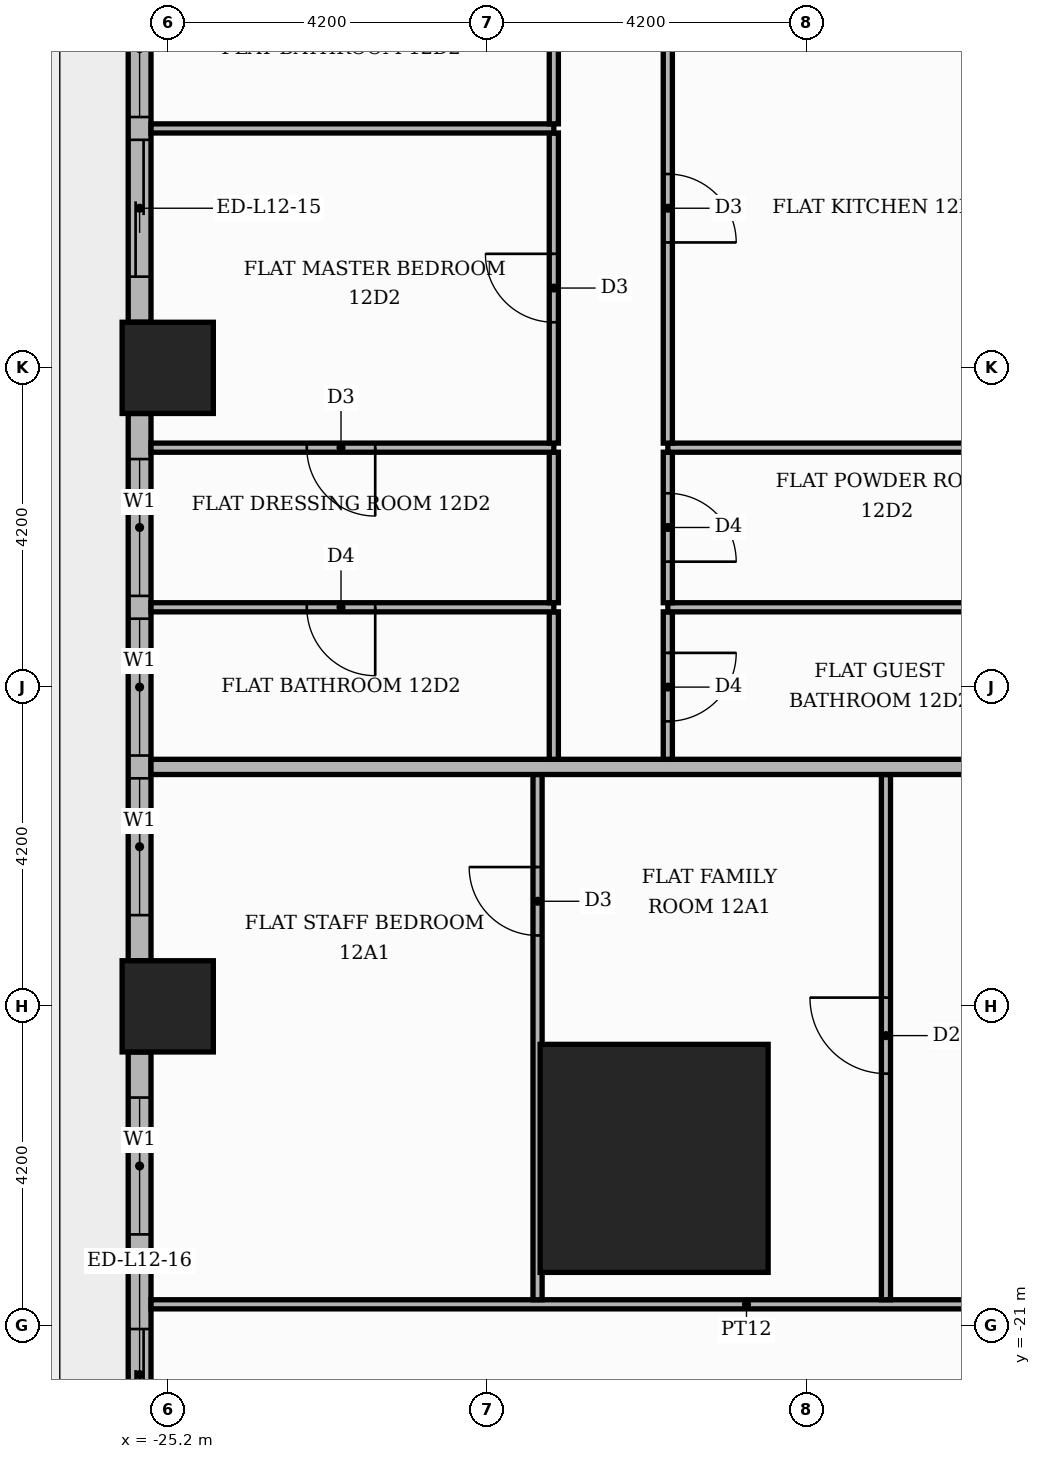
"""IFC4 building model, lengths in metres.
Left out: names, types, materials, properties, quantities, classifications, styles, units other than length and angle.
Written with IfcOpenShell. Run it as: python <this file> out.ifc"""

import sys

from ifc_helpers import new_model, si_unit, direction, frame, frame_2d, origin, origin_2d, place, context, subcontext, project, spatial, rectangle, extrude, element, fill, save


model = new_model("IFC4")
c1 = context("Model", 3, precision=1e-05, world=origin(), true_north=direction((0.0, 1.0)))
c2 = subcontext(c1, "Body", "Model", "MODEL_VIEW")
j1 = project(units=[si_unit("LENGTHUNIT", "METRE"), si_unit("PLANEANGLEUNIT", "RADIAN")], contexts=[c1])
p1 = place(None, origin())
s1 = spatial("IfcSite", under=j1, at=p1, CompositionType="ELEMENT")
p2 = place(p1, origin())
s2 = spatial("IfcBuilding", under=s1, at=p2, CompositionType="ELEMENT")
p3 = place(p2, frame((0.0, 0.0, 54.3)))
s3 = spatial("IfcBuildingStorey", under=s2, at=p3, CompositionType="ELEMENT", Elevation=54.3)
p4 = place(p3, frame((-18.8, -18.8, 0.0), z_axis=(0.0, 0.0, 1.0), x_axis=(1.0, 0.0, 0.0)))
e1 = element("IfcColumn", 1, at=p4, inside=s3, PredefinedType="COLUMN", context=c2, shape_type="SweptSolid", body=[
    extrude(rectangle(XDim=3.0, YDim=3.0, at=origin_2d()), origin(), (0.0, 0.0, 1.0), 3.9),
])
for number, where, z_axis, x_axis in (
    (2, (-25.2, -8.4, 0.0), (0.0, 0.0, 1.0), (1.0, 0.0, 0.0)),
    (3, (-25.2, -16.8, 0.0), (0.0, 0.0, 1.0), (1.0, 0.0, 0.0)),
):
    element("IfcColumn", number, at=place(p3, frame(where, z_axis=z_axis, x_axis=x_axis)), inside=s3, PredefinedType="COLUMN", context=c2, shape_type="SweptSolid", body=[
        extrude(rectangle(XDim=1.2, YDim=1.2, at=origin_2d()), origin(), (0.0, 0.0, 1.0), 3.9),
    ])
p5 = place(p3, frame((-25.57, -0.6, 0.0), z_axis=(0.0, 0.0, 1.0), x_axis=(0.0, -1.0, 0.0)))
e4 = element("IfcWall", 4, at=p5, inside=s3, PredefinedType="STANDARD", context=c2, shape_type="SweptSolid", body=[
    extrude(rectangle(XDim=7.2, YDim=0.3, at=frame_2d((3.6, 0.0))), origin(), (0.0, 0.0, 1.0), 3.48),
])
p6 = place(p5, frame((0.6, 0.0, 0.9)))
e5 = element("IfcOpeningElement", 5, at=p6, cuts=e4, PredefinedType="OPENING", context=c2, shape_type="SweptSolid", body=[
    extrude(rectangle(XDim=1.8, YDim=2.1, at=frame_2d((0.9, 1.05))), frame((0.0, 0.16, 0.0), z_axis=(0.0, -1.0, 0.0), x_axis=(1.0, 0.0, 0.0)), (0.0, 0.0, 1.0), 0.32),
])
p7 = place(p5, frame((2.7, 0.0, 0.9)))
e6 = element("IfcOpeningElement", 6, at=p7, cuts=e4, PredefinedType="OPENING", context=c2, shape_type="SweptSolid", body=[
    extrude(rectangle(XDim=1.8, YDim=2.1, at=frame_2d((0.9, 1.05))), frame((0.0, 0.16, 0.0), z_axis=(0.0, -1.0, 0.0), x_axis=(1.0, 0.0, 0.0)), (0.0, 0.0, 1.0), 0.32),
])
p8 = place(p5, frame((4.8, 0.0, 0.0)))
e7 = element("IfcOpeningElement", 7, at=p8, cuts=e4, PredefinedType="OPENING", context=c2, shape_type="SweptSolid", body=[
    extrude(rectangle(XDim=1.8, YDim=2.4, at=frame_2d((0.9, 1.2))), frame((0.0, 0.16, 0.0), z_axis=(0.0, -1.0, 0.0), x_axis=(1.0, 0.0, 0.0)), (0.0, 0.0, 1.0), 0.32),
])
p9 = place(p3, frame((-25.57, -9.0, 0.0), z_axis=(0.0, 0.0, 1.0), x_axis=(0.0, -1.0, 0.0)))
e8 = element("IfcWall", 8, at=p9, inside=s3, PredefinedType="STANDARD", context=c2, shape_type="SweptSolid", body=[
    extrude(rectangle(XDim=7.2, YDim=0.3, at=frame_2d((3.6, 0.0))), origin(), (0.0, 0.0, 1.0), 3.48),
])
p10 = place(p9, frame((0.6, 0.0, 0.9)))
e9 = element("IfcOpeningElement", 9, at=p10, cuts=e8, PredefinedType="OPENING", context=c2, shape_type="SweptSolid", body=[
    extrude(rectangle(XDim=1.8, YDim=2.1, at=frame_2d((0.9, 1.05))), frame((0.0, 0.16, 0.0), z_axis=(0.0, -1.0, 0.0), x_axis=(1.0, 0.0, 0.0)), (0.0, 0.0, 1.0), 0.32),
])
p11 = place(p9, frame((2.7, 0.0, 0.9)))
e10 = element("IfcOpeningElement", 10, at=p11, cuts=e8, PredefinedType="OPENING", context=c2, shape_type="SweptSolid", body=[
    extrude(rectangle(XDim=1.8, YDim=2.1, at=frame_2d((0.9, 1.05))), frame((0.0, 0.16, 0.0), z_axis=(0.0, -1.0, 0.0), x_axis=(1.0, 0.0, 0.0)), (0.0, 0.0, 1.0), 0.32),
])
p12 = place(p9, frame((4.8, 0.0, 0.9)))
e11 = element("IfcOpeningElement", 11, at=p12, cuts=e8, PredefinedType="OPENING", context=c2, shape_type="SweptSolid", body=[
    extrude(rectangle(XDim=1.8, YDim=2.1, at=frame_2d((0.9, 1.05))), frame((0.0, 0.16, 0.0), z_axis=(0.0, -1.0, 0.0), x_axis=(1.0, 0.0, 0.0)), (0.0, 0.0, 1.0), 0.32),
])
p13 = place(p3, frame((-25.57, -17.4, 0.0), z_axis=(0.0, 0.0, 1.0), x_axis=(0.0, -1.0, 0.0)))
e12 = element("IfcWall", 12, at=p13, inside=s3, PredefinedType="STANDARD", context=c2, shape_type="SweptSolid", body=[
    extrude(rectangle(XDim=5.32, YDim=0.3, at=frame_2d((2.66, 0.0))), origin(), (0.0, 0.0, 1.0), 3.48),
])
p14 = place(p13, frame((0.6, 0.0, 0.9)))
e13 = element("IfcOpeningElement", 13, at=p14, cuts=e12, PredefinedType="OPENING", context=c2, shape_type="SweptSolid", body=[
    extrude(rectangle(XDim=1.8, YDim=2.1, at=frame_2d((0.9, 1.05))), frame((0.0, 0.16, 0.0), z_axis=(0.0, -1.0, 0.0), x_axis=(1.0, 0.0, 0.0)), (0.0, 0.0, 1.0), 0.32),
])
p15 = place(p13, frame((3.645, 0.0, 0.0)))
e14 = element("IfcOpeningElement", 14, at=p15, cuts=e12, PredefinedType="OPENING", context=c2, shape_type="SweptSolid", body=[
    extrude(rectangle(XDim=1.2, YDim=2.4, at=frame_2d((0.6, 1.2))), frame((0.0, 0.16, 0.0), z_axis=(0.0, -1.0, 0.0), x_axis=(1.0, 0.0, 0.0)), (0.0, 0.0, 1.0), 0.32),
])
p16 = place(p3, frame((-25.42, -20.72, 0.0), z_axis=(0.0, 0.0, 1.0), x_axis=(1.0, 0.0, 0.0)))
e15 = element("IfcWall", 15, at=p16, inside=s3, PredefinedType="PARTITIONING", context=c2, shape_type="SweptSolid", body=[
    extrude(rectangle(XDim=15.67, YDim=0.12, at=frame_2d((7.835, 0.0))), origin(), (0.0, 0.0, 1.0), 3.48),
])
p17 = place(p16, frame((12.32, 0.0, 0.0)))
e16 = element("IfcOpeningElement", 16, at=p17, cuts=e15, PredefinedType="OPENING", context=c2, shape_type="SweptSolid", body=[
    extrude(rectangle(XDim=1.0, YDim=2.1, at=frame_2d((0.5, 1.05))), frame((0.0, 0.07, 0.0), z_axis=(0.0, -1.0, 0.0), x_axis=(1.0, 0.0, 0.0)), (0.0, 0.0, 1.0), 0.14),
])
p18 = place(p3, frame((-20.334, -20.66, 0.0), z_axis=(0.0, 0.0, 1.0), x_axis=(0.0, 1.0, 0.0)))
e17 = element("IfcWall", 17, at=p18, inside=s3, PredefinedType="PARTITIONING", context=c2, shape_type="SweptSolid", body=[
    extrude(rectangle(XDim=6.91, YDim=0.12, at=frame_2d((3.455, 0.0))), origin(), (0.0, 0.0, 1.0), 3.48),
])
p19 = place(p18, frame((4.792, 0.0, 0.0)))
e18 = element("IfcOpeningElement", 18, at=p19, cuts=e17, PredefinedType="OPENING", context=c2, shape_type="SweptSolid", body=[
    extrude(rectangle(XDim=0.9, YDim=2.1, at=frame_2d((0.45, 1.05))), frame((0.0, 0.07, 0.0), z_axis=(0.0, -1.0, 0.0), x_axis=(1.0, 0.0, 0.0)), (0.0, 0.0, 1.0), 0.14),
])
p20 = place(p3, frame((-15.75, -20.66, 0.0), z_axis=(0.0, 0.0, 1.0), x_axis=(0.0, 1.0, 0.0)))
e19 = element("IfcWall", 19, at=p20, inside=s3, PredefinedType="PARTITIONING", context=c2, shape_type="SweptSolid", body=[
    extrude(rectangle(XDim=6.91, YDim=0.12, at=frame_2d((3.455, 0.0))), origin(), (0.0, 0.0, 1.0), 3.48),
])
p21 = place(p20, frame((2.975, 0.0, 0.0)))
e20 = element("IfcOpeningElement", 20, at=p21, cuts=e19, PredefinedType="OPENING", context=c2, shape_type="SweptSolid", body=[
    extrude(rectangle(XDim=1.0, YDim=2.1, at=frame_2d((0.5, 1.05))), frame((0.0, 0.07, 0.0), z_axis=(0.0, -1.0, 0.0), x_axis=(1.0, 0.0, 0.0)), (0.0, 0.0, 1.0), 0.14),
])
p22 = place(p3, frame((-25.42, -13.65, 0.0), z_axis=(0.0, 0.0, 1.0), x_axis=(1.0, 0.0, 0.0)))
e21 = element("IfcWall", 21, at=p22, inside=s3, PredefinedType="PARTITIONING", context=c2, shape_type="SweptSolid", body=[
    extrude(rectangle(XDim=39.07, YDim=0.2, at=frame_2d((19.535, 0.0))), origin(), (0.0, 0.0, 1.0), 3.48),
])
p23 = place(p22, frame((13.32, 0.0, 0.0)))
e22 = element("IfcOpeningElement", 22, at=p23, cuts=e21, PredefinedType="OPENING", context=c2, shape_type="SweptSolid", body=[
    extrude(rectangle(XDim=1.1, YDim=2.4, at=frame_2d((0.55, 1.2))), frame((0.0, 0.11, 0.0), z_axis=(0.0, -1.0, 0.0), x_axis=(1.0, 0.0, 0.0)), (0.0, 0.0, 1.0), 0.22),
])
p24 = place(p22, frame((25.92, 0.0, 0.0)))
e23 = element("IfcOpeningElement", 23, at=p24, cuts=e21, PredefinedType="OPENING", context=c2, shape_type="SweptSolid", body=[
    extrude(rectangle(XDim=1.1, YDim=2.4, at=frame_2d((0.55, 1.2))), frame((0.0, 0.11, 0.0), z_axis=(0.0, -1.0, 0.0), x_axis=(1.0, 0.0, 0.0)), (0.0, 0.0, 1.0), 0.22),
])
p25 = place(p3, frame((-20.12, -13.55, 0.0), z_axis=(0.0, 0.0, 1.0), x_axis=(0.0, 1.0, 0.0)))
e24 = element("IfcWall", 24, at=p25, inside=s3, PredefinedType="PARTITIONING", context=c2, shape_type="SweptSolid", body=[
    extrude(rectangle(XDim=1.94, YDim=0.12, at=frame_2d((0.97, 0.0))), origin(), (0.0, 0.0, 1.0), 3.48),
])
p26 = place(p3, frame((-18.62, -13.55, 0.0), z_axis=(0.0, 0.0, 1.0), x_axis=(0.0, 1.0, 0.0)))
e25 = element("IfcWall", 25, at=p26, inside=s3, PredefinedType="PARTITIONING", context=c2, shape_type="SweptSolid", body=[
    extrude(rectangle(XDim=1.94, YDim=0.12, at=frame_2d((0.97, 0.0))), origin(), (0.0, 0.0, 1.0), 3.48),
])
p27 = place(p26, frame((0.5, 0.0, 0.0)))
e26 = element("IfcOpeningElement", 26, at=p27, cuts=e25, PredefinedType="OPENING", context=c2, shape_type="SweptSolid", body=[
    extrude(rectangle(XDim=0.9, YDim=2.1, at=frame_2d((0.45, 1.05))), frame((0.0, 0.07, 0.0), z_axis=(0.0, -1.0, 0.0), x_axis=(1.0, 0.0, 0.0)), (0.0, 0.0, 1.0), 0.14),
])
p28 = place(p3, frame((-25.42, -11.55, 0.0), z_axis=(0.0, 0.0, 1.0), x_axis=(1.0, 0.0, 0.0)))
e27 = element("IfcWall", 27, at=p28, inside=s3, PredefinedType="PARTITIONING", context=c2, shape_type="SweptSolid", body=[
    extrude(rectangle(XDim=5.3, YDim=0.12, at=frame_2d((2.65, 0.0))), origin(), (0.0, 0.0, 1.0), 3.48),
])
p29 = place(p28, frame((2.05, 0.0, 0.0)))
e28 = element("IfcOpeningElement", 28, at=p29, cuts=e27, PredefinedType="OPENING", context=c2, shape_type="SweptSolid", body=[
    extrude(rectangle(XDim=0.9, YDim=2.1, at=frame_2d((0.45, 1.05))), frame((0.0, 0.07, 0.0), z_axis=(0.0, -1.0, 0.0), x_axis=(1.0, 0.0, 0.0)), (0.0, 0.0, 1.0), 0.14),
])
p30 = place(p3, frame((-18.62, -11.55, 0.0), z_axis=(0.0, 0.0, 1.0), x_axis=(1.0, 0.0, 0.0)))
e29 = element("IfcWall", 29, at=p30, inside=s3, PredefinedType="PARTITIONING", context=c2, shape_type="SweptSolid", body=[
    extrude(rectangle(XDim=4.87, YDim=0.12, at=frame_2d((2.435, 0.0))), origin(), (0.0, 0.0, 1.0), 3.48),
])
p31 = place(p3, frame((-20.12, -11.49, 0.0), z_axis=(0.0, 0.0, 1.0), x_axis=(0.0, 1.0, 0.0)))
e30 = element("IfcWall", 30, at=p31, inside=s3, PredefinedType="PARTITIONING", context=c2, shape_type="SweptSolid", body=[
    extrude(rectangle(XDim=1.98, YDim=0.12, at=frame_2d((0.99, 0.0))), origin(), (0.0, 0.0, 1.0), 3.48),
])
p32 = place(p3, frame((-18.62, -11.49, 0.0), z_axis=(0.0, 0.0, 1.0), x_axis=(0.0, 1.0, 0.0)))
e31 = element("IfcWall", 31, at=p32, inside=s3, PredefinedType="PARTITIONING", context=c2, shape_type="SweptSolid", body=[
    extrude(rectangle(XDim=1.98, YDim=0.12, at=frame_2d((0.99, 0.0))), origin(), (0.0, 0.0, 1.0), 3.48),
])
p33 = place(p32, frame((0.54, 0.0, 0.0)))
e32 = element("IfcOpeningElement", 32, at=p33, cuts=e31, PredefinedType="OPENING", context=c2, shape_type="SweptSolid", body=[
    extrude(rectangle(XDim=0.9, YDim=2.1, at=frame_2d((0.45, 1.05))), frame((0.0, 0.07, 0.0), z_axis=(0.0, -1.0, 0.0), x_axis=(1.0, 0.0, 0.0)), (0.0, 0.0, 1.0), 0.14),
])
p34 = place(p3, frame((-25.42, -9.45, 0.0), z_axis=(0.0, 0.0, 1.0), x_axis=(1.0, 0.0, 0.0)))
e33 = element("IfcWall", 33, at=p34, inside=s3, PredefinedType="PARTITIONING", context=c2, shape_type="SweptSolid", body=[
    extrude(rectangle(XDim=5.3, YDim=0.12, at=frame_2d((2.65, 0.0))), origin(), (0.0, 0.0, 1.0), 3.48),
])
p35 = place(p34, frame((2.05, 0.0, 0.0)))
e34 = element("IfcOpeningElement", 34, at=p35, cuts=e33, PredefinedType="OPENING", context=c2, shape_type="SweptSolid", body=[
    extrude(rectangle(XDim=0.9, YDim=2.1, at=frame_2d((0.45, 1.05))), frame((0.0, 0.07, 0.0), z_axis=(0.0, -1.0, 0.0), x_axis=(1.0, 0.0, 0.0)), (0.0, 0.0, 1.0), 0.14),
])
p36 = place(p3, frame((-18.62, -9.45, 0.0), z_axis=(0.0, 0.0, 1.0), x_axis=(1.0, 0.0, 0.0)))
e35 = element("IfcWall", 35, at=p36, inside=s3, PredefinedType="PARTITIONING", context=c2, shape_type="SweptSolid", body=[
    extrude(rectangle(XDim=4.87, YDim=0.12, at=frame_2d((2.435, 0.0))), origin(), (0.0, 0.0, 1.0), 3.48),
])
p37 = place(p3, frame((-20.12, -9.39, 0.0), z_axis=(0.0, 0.0, 1.0), x_axis=(0.0, 1.0, 0.0)))
e36 = element("IfcWall", 36, at=p37, inside=s3, PredefinedType="PARTITIONING", context=c2, shape_type="SweptSolid", body=[
    extrude(rectangle(XDim=4.08, YDim=0.12, at=frame_2d((2.04, 0.0))), origin(), (0.0, 0.0, 1.0), 3.48),
])
p38 = place(p37, frame((1.59, 0.0, 0.0)))
e37 = element("IfcOpeningElement", 37, at=p38, cuts=e36, PredefinedType="OPENING", context=c2, shape_type="SweptSolid", body=[
    extrude(rectangle(XDim=0.9, YDim=2.1, at=frame_2d((0.45, 1.05))), frame((0.0, 0.07, 0.0), z_axis=(0.0, -1.0, 0.0), x_axis=(1.0, 0.0, 0.0)), (0.0, 0.0, 1.0), 0.14),
])
p39 = place(p3, frame((-18.62, -9.39, 0.0), z_axis=(0.0, 0.0, 1.0), x_axis=(0.0, 1.0, 0.0)))
e38 = element("IfcWall", 38, at=p39, inside=s3, PredefinedType="PARTITIONING", context=c2, shape_type="SweptSolid", body=[
    extrude(rectangle(XDim=6.18, YDim=0.12, at=frame_2d((3.09, 0.0))), origin(), (0.0, 0.0, 1.0), 3.48),
])
p40 = place(p39, frame((2.64, 0.0, 0.0)))
e39 = element("IfcOpeningElement", 39, at=p40, cuts=e38, PredefinedType="OPENING", context=c2, shape_type="SweptSolid", body=[
    extrude(rectangle(XDim=0.9, YDim=2.1, at=frame_2d((0.45, 1.05))), frame((0.0, 0.07, 0.0), z_axis=(0.0, -1.0, 0.0), x_axis=(1.0, 0.0, 0.0)), (0.0, 0.0, 1.0), 0.14),
])
p41 = place(p3, frame((-25.42, -5.25, 0.0), z_axis=(0.0, 0.0, 1.0), x_axis=(1.0, 0.0, 0.0)))
e40 = element("IfcWall", 40, at=p41, inside=s3, PredefinedType="PARTITIONING", context=c2, shape_type="SweptSolid", body=[
    extrude(rectangle(XDim=5.3, YDim=0.12, at=frame_2d((2.65, 0.0))), origin(), (0.0, 0.0, 1.0), 3.48),
])
p42 = place(p3, frame((-20.12, -5.19, 0.0), z_axis=(0.0, 0.0, 1.0), x_axis=(0.0, 1.0, 0.0)))
e41 = element("IfcWall", 41, at=p42, inside=s3, PredefinedType="PARTITIONING", context=c2, shape_type="SweptSolid", body=[
    extrude(rectangle(XDim=1.98, YDim=0.12, at=frame_2d((0.99, 0.0))), origin(), (0.0, 0.0, 1.0), 3.48),
])
p43 = place(p7, origin())
e42 = element("IfcWindow", 42, at=p43, inside=s3, PartitioningType="SINGLE_PANEL", PredefinedType="WINDOW", context=c2, shape_type="SweptSolid", body=[
    extrude(rectangle(XDim=1.8, YDim=2.1, at=frame_2d((0.9, 1.05))), frame((0.0, 0.03, 0.0), z_axis=(0.0, -1.0, 0.0), x_axis=(1.0, 0.0, 0.0)), (0.0, 0.0, 1.0), 0.06),
])
fill(e6, e42)
p44 = place(p8, origin())
e43 = element("IfcDoor", 43, at=p44, inside=s3, OperationType="SLIDING_TO_RIGHT", PredefinedType="DOOR", context=c2, shape_type="SweptSolid", body=[
    extrude(rectangle(XDim=1.8, YDim=2.4, at=frame_2d((0.9, 1.2))), frame((0.0, 0.025, 0.0), z_axis=(0.0, -1.0, 0.0), x_axis=(1.0, 0.0, 0.0)), (0.0, 0.0, 1.0), 0.05),
])
fill(e7, e43)
p45 = place(p10, origin())
e44 = element("IfcWindow", 44, at=p45, inside=s3, PartitioningType="SINGLE_PANEL", PredefinedType="WINDOW", context=c2, shape_type="SweptSolid", body=[
    extrude(rectangle(XDim=1.8, YDim=2.1, at=frame_2d((0.9, 1.05))), frame((0.0, 0.03, 0.0), z_axis=(0.0, -1.0, 0.0), x_axis=(1.0, 0.0, 0.0)), (0.0, 0.0, 1.0), 0.06),
])
fill(e9, e44)
p46 = place(p11, origin())
e45 = element("IfcWindow", 45, at=p46, inside=s3, PartitioningType="SINGLE_PANEL", PredefinedType="WINDOW", context=c2, shape_type="SweptSolid", body=[
    extrude(rectangle(XDim=1.8, YDim=2.1, at=frame_2d((0.9, 1.05))), frame((0.0, 0.03, 0.0), z_axis=(0.0, -1.0, 0.0), x_axis=(1.0, 0.0, 0.0)), (0.0, 0.0, 1.0), 0.06),
])
fill(e10, e45)
p47 = place(p12, origin())
e46 = element("IfcWindow", 46, at=p47, inside=s3, PartitioningType="SINGLE_PANEL", PredefinedType="WINDOW", context=c2, shape_type="SweptSolid", body=[
    extrude(rectangle(XDim=1.8, YDim=2.1, at=frame_2d((0.9, 1.05))), frame((0.0, 0.03, 0.0), z_axis=(0.0, -1.0, 0.0), x_axis=(1.0, 0.0, 0.0)), (0.0, 0.0, 1.0), 0.06),
])
fill(e11, e46)
p48 = place(p14, origin())
e47 = element("IfcWindow", 47, at=p48, inside=s3, PartitioningType="SINGLE_PANEL", PredefinedType="WINDOW", context=c2, shape_type="SweptSolid", body=[
    extrude(rectangle(XDim=1.8, YDim=2.1, at=frame_2d((0.9, 1.05))), frame((0.0, 0.03, 0.0), z_axis=(0.0, -1.0, 0.0), x_axis=(1.0, 0.0, 0.0)), (0.0, 0.0, 1.0), 0.06),
])
fill(e13, e47)
p49 = place(p15, origin())
e48 = element("IfcDoor", 48, at=p49, inside=s3, OperationType="SLIDING_TO_RIGHT", PredefinedType="DOOR", context=c2, shape_type="SweptSolid", body=[
    extrude(rectangle(XDim=1.2, YDim=2.4, at=frame_2d((0.6, 1.2))), frame((0.0, 0.025, 0.0), z_axis=(0.0, -1.0, 0.0), x_axis=(1.0, 0.0, 0.0)), (0.0, 0.0, 1.0), 0.05),
])
fill(e14, e48)
p50 = place(p19, origin())
e49 = element("IfcDoor", 49, at=p50, inside=s3, OperationType="SINGLE_SWING_RIGHT", PredefinedType="DOOR", context=c2, shape_type="SweptSolid", body=[
    extrude(rectangle(XDim=0.9, YDim=2.1, at=frame_2d((0.45, 1.05))), frame((0.0, 0.025, 0.0), z_axis=(0.0, -1.0, 0.0), x_axis=(1.0, 0.0, 0.0)), (0.0, 0.0, 1.0), 0.05),
])
fill(e18, e49)
p51 = place(p21, origin())
e50 = element("IfcDoor", 50, at=p51, inside=s3, OperationType="SINGLE_SWING_RIGHT", PredefinedType="DOOR", context=c2, shape_type="SweptSolid", body=[
    extrude(rectangle(XDim=1.0, YDim=2.1, at=frame_2d((0.5, 1.05))), frame((0.0, 0.025, 0.0), z_axis=(0.0, -1.0, 0.0), x_axis=(1.0, 0.0, 0.0)), (0.0, 0.0, 1.0), 0.05),
])
fill(e20, e50)
p52 = place(p40, frame((0.9, 0.0, 0.0), z_axis=(0.0, 0.0, 1.0), x_axis=(-1.0, 0.0, 0.0)))
e51 = element("IfcDoor", 51, at=p52, inside=s3, OperationType="SINGLE_SWING_LEFT", PredefinedType="DOOR", context=c2, shape_type="SweptSolid", body=[
    extrude(rectangle(XDim=0.9, YDim=2.1, at=frame_2d((0.45, 1.05))), frame((0.0, 0.025, 0.0), z_axis=(0.0, -1.0, 0.0), x_axis=(1.0, 0.0, 0.0)), (0.0, 0.0, 1.0), 0.05),
])
fill(e39, e51)
p53 = place(p33, frame((0.9, 0.0, 0.0), z_axis=(0.0, 0.0, 1.0), x_axis=(-1.0, 0.0, 0.0)))
e52 = element("IfcDoor", 52, at=p53, inside=s3, OperationType="SINGLE_SWING_LEFT", PredefinedType="DOOR", context=c2, shape_type="SweptSolid", body=[
    extrude(rectangle(XDim=0.9, YDim=2.1, at=frame_2d((0.45, 1.05))), frame((0.0, 0.025, 0.0), z_axis=(0.0, -1.0, 0.0), x_axis=(1.0, 0.0, 0.0)), (0.0, 0.0, 1.0), 0.05),
])
fill(e32, e52)
p54 = place(p27, frame((0.9, 0.0, 0.0), z_axis=(0.0, 0.0, 1.0), x_axis=(-1.0, 0.0, 0.0)))
e53 = element("IfcDoor", 53, at=p54, inside=s3, OperationType="SINGLE_SWING_RIGHT", PredefinedType="DOOR", context=c2, shape_type="SweptSolid", body=[
    extrude(rectangle(XDim=0.9, YDim=2.1, at=frame_2d((0.45, 1.05))), frame((0.0, 0.025, 0.0), z_axis=(0.0, -1.0, 0.0), x_axis=(1.0, 0.0, 0.0)), (0.0, 0.0, 1.0), 0.05),
])
fill(e26, e53)
p55 = place(p38, origin())
e54 = element("IfcDoor", 54, at=p55, inside=s3, OperationType="SINGLE_SWING_RIGHT", PredefinedType="DOOR", context=c2, shape_type="SweptSolid", body=[
    extrude(rectangle(XDim=0.9, YDim=2.1, at=frame_2d((0.45, 1.05))), frame((0.0, 0.025, 0.0), z_axis=(0.0, -1.0, 0.0), x_axis=(1.0, 0.0, 0.0)), (0.0, 0.0, 1.0), 0.05),
])
fill(e37, e54)
p56 = place(p35, frame((0.9, 0.0, 0.0), z_axis=(0.0, 0.0, 1.0), x_axis=(-1.0, 0.0, 0.0)))
e55 = element("IfcDoor", 55, at=p56, inside=s3, OperationType="SINGLE_SWING_RIGHT", PredefinedType="DOOR", context=c2, shape_type="SweptSolid", body=[
    extrude(rectangle(XDim=0.9, YDim=2.1, at=frame_2d((0.45, 1.05))), frame((0.0, 0.025, 0.0), z_axis=(0.0, -1.0, 0.0), x_axis=(1.0, 0.0, 0.0)), (0.0, 0.0, 1.0), 0.05),
])
fill(e34, e55)
p57 = place(p29, frame((0.9, 0.0, 0.0), z_axis=(0.0, 0.0, 1.0), x_axis=(-1.0, 0.0, 0.0)))
e56 = element("IfcDoor", 56, at=p57, inside=s3, OperationType="SINGLE_SWING_RIGHT", PredefinedType="DOOR", context=c2, shape_type="SweptSolid", body=[
    extrude(rectangle(XDim=0.9, YDim=2.1, at=frame_2d((0.45, 1.05))), frame((0.0, 0.025, 0.0), z_axis=(0.0, -1.0, 0.0), x_axis=(1.0, 0.0, 0.0)), (0.0, 0.0, 1.0), 0.05),
])
fill(e28, e56)
save(model, sys.argv[1])
